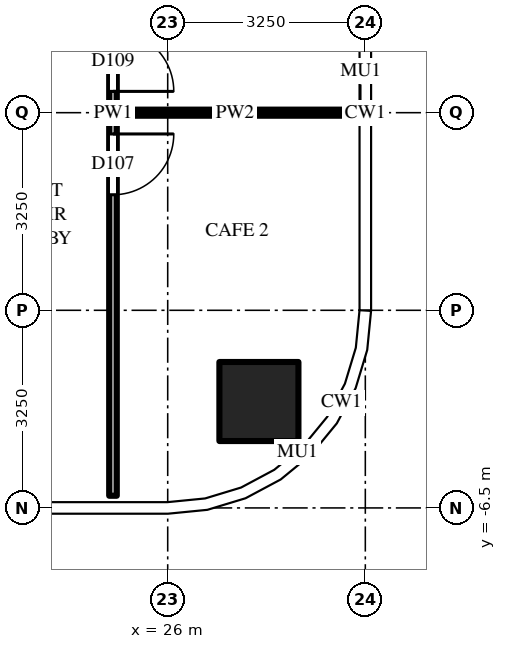
"""IFC4 building model, lengths in metres.
Left out: names, types, materials, properties, quantities, classifications, styles, units other than length and angle.
Written with IfcOpenShell. Run it as: python <this file> out.ifc"""

import sys

from ifc_helpers import new_model, si_unit, direction, frame, frame_2d, origin, origin_2d, place, context, subcontext, project, spatial, rectangle, extrude, source, transform, mapped, element, fill, save


model = new_model("IFC4")
c1 = context("Model", 3, precision=1e-05, world=origin(), true_north=direction((0.0, 1.0)))
c2 = subcontext(c1, "Body", "Model", "MODEL_VIEW")
j1 = project(units=[si_unit("LENGTHUNIT", "METRE"), si_unit("PLANEANGLEUNIT", "RADIAN")], contexts=[c1])
p1 = place(None, origin())
s1 = spatial("IfcSite", under=j1, at=p1, CompositionType="ELEMENT")
p2 = place(p1, origin())
s2 = spatial("IfcBuilding", under=s1, at=p2, CompositionType="ELEMENT")
p3 = place(p2, frame((0.0, 0.0, 138.0)))
s3 = spatial("IfcBuildingStorey", under=s2, at=p3, CompositionType="ELEMENT", Elevation=138.0)
m1 = source(origin(), c2, "Body", "SweptSolid", [
    extrude(rectangle(XDim=1.3, YDim=1.3, at=origin_2d()), origin(), (0.0, 0.0, 1.0), 4.5),
])
p4 = place(p3, frame((27.5, -4.75, 0.0), z_axis=(0.0, 0.0, 1.0), x_axis=(1.0, 0.0, 0.0)))
e1 = element("IfcColumn", 1, at=p4, inside=s3, PredefinedType="COLUMN", context=c2, shape_type="MappedRepresentation", body=[
    mapped(m1, transform((0.0, 0.0, 0.0))),
])
m2 = source(origin(), c2, "Body", "SweptSolid", [
    extrude(rectangle(XDim=12.6, YDim=0.125, at=frame_2d((6.3, 0.0))), origin(), (0.0, 0.0, 1.0), 3.33),
])
p5 = place(p3, frame((25.1, 6.3, 0.0), z_axis=(0.0, 0.0, 1.0), x_axis=(0.0, -1.0, 0.0)))
e2 = element("IfcWall", 2, at=p5, inside=s3, PredefinedType="PARTITIONING", context=c2, shape_type="MappedRepresentation", body=[
    mapped(m2, transform((0.0, 0.0, 0.0))),
])
m3 = source(origin(), c2, "Body", "SweptSolid", [
    extrude(rectangle(XDim=1.0, YDim=2.1, at=frame_2d((0.5, 1.05))), frame((0.0, 0.073, 0.0), z_axis=(0.0, -1.0, 0.0), x_axis=(1.0, 0.0, 0.0)), (0.0, 0.0, 1.0), 0.145),
])
p6 = place(p5, frame((6.65, 0.0, 0.0)))
e3 = element("IfcOpeningElement", 3, at=p6, cuts=e2, PredefinedType="OPENING", context=c2, shape_type="MappedRepresentation", body=[
    mapped(m3, transform((0.0, 0.0, 0.0))),
])
p7 = place(p5, frame((4.95, 0.0, 0.0)))
e4 = element("IfcOpeningElement", 4, at=p7, cuts=e2, PredefinedType="OPENING", context=c2, shape_type="MappedRepresentation", body=[
    mapped(m3, transform((0.0, 0.0, 0.0))),
])
m4 = source(origin(), c2, "Body", "SweptSolid", [
    extrude(rectangle(XDim=3.887, YDim=0.1, at=frame_2d((1.944, 0.0))), origin(), (0.0, 0.0, 1.0), 3.33),
])
p8 = place(p3, frame((25.163, 0.0, 0.0), z_axis=(0.0, 0.0, 1.0), x_axis=(1.0, 0.0, 0.0)))
e5 = element("IfcWall", 5, at=p8, inside=s3, PredefinedType="PARTITIONING", context=c2, shape_type="MappedRepresentation", body=[
    mapped(m4, transform((0.0, 0.0, 0.0))),
])
m5 = source(origin(), c2, "Body", "SweptSolid", [
    extrude(rectangle(XDim=1.0, YDim=2.1, at=frame_2d((0.5, 1.05))), frame((0.0, 0.025, 0.0), z_axis=(0.0, -1.0, 0.0), x_axis=(1.0, 0.0, 0.0)), (0.0, 0.0, 1.0), 0.05),
])
p9 = place(p6, origin())
e6 = element("IfcDoor", 6, at=p9, inside=s3, OperationType="SINGLE_SWING_LEFT", PredefinedType="DOOR", context=c2, shape_type="MappedRepresentation", body=[
    mapped(m5, transform((0.0, 0.0, 0.0))),
])
fill(e3, e6)
p10 = place(p7, origin())
e7 = element("IfcDoor", 7, at=p10, inside=s3, OperationType="SINGLE_SWING_RIGHT", PredefinedType="DOOR", context=c2, shape_type="MappedRepresentation", body=[
    mapped(m5, transform((0.0, 0.0, 0.0))),
])
fill(e4, e7)
save(model, sys.argv[1])
